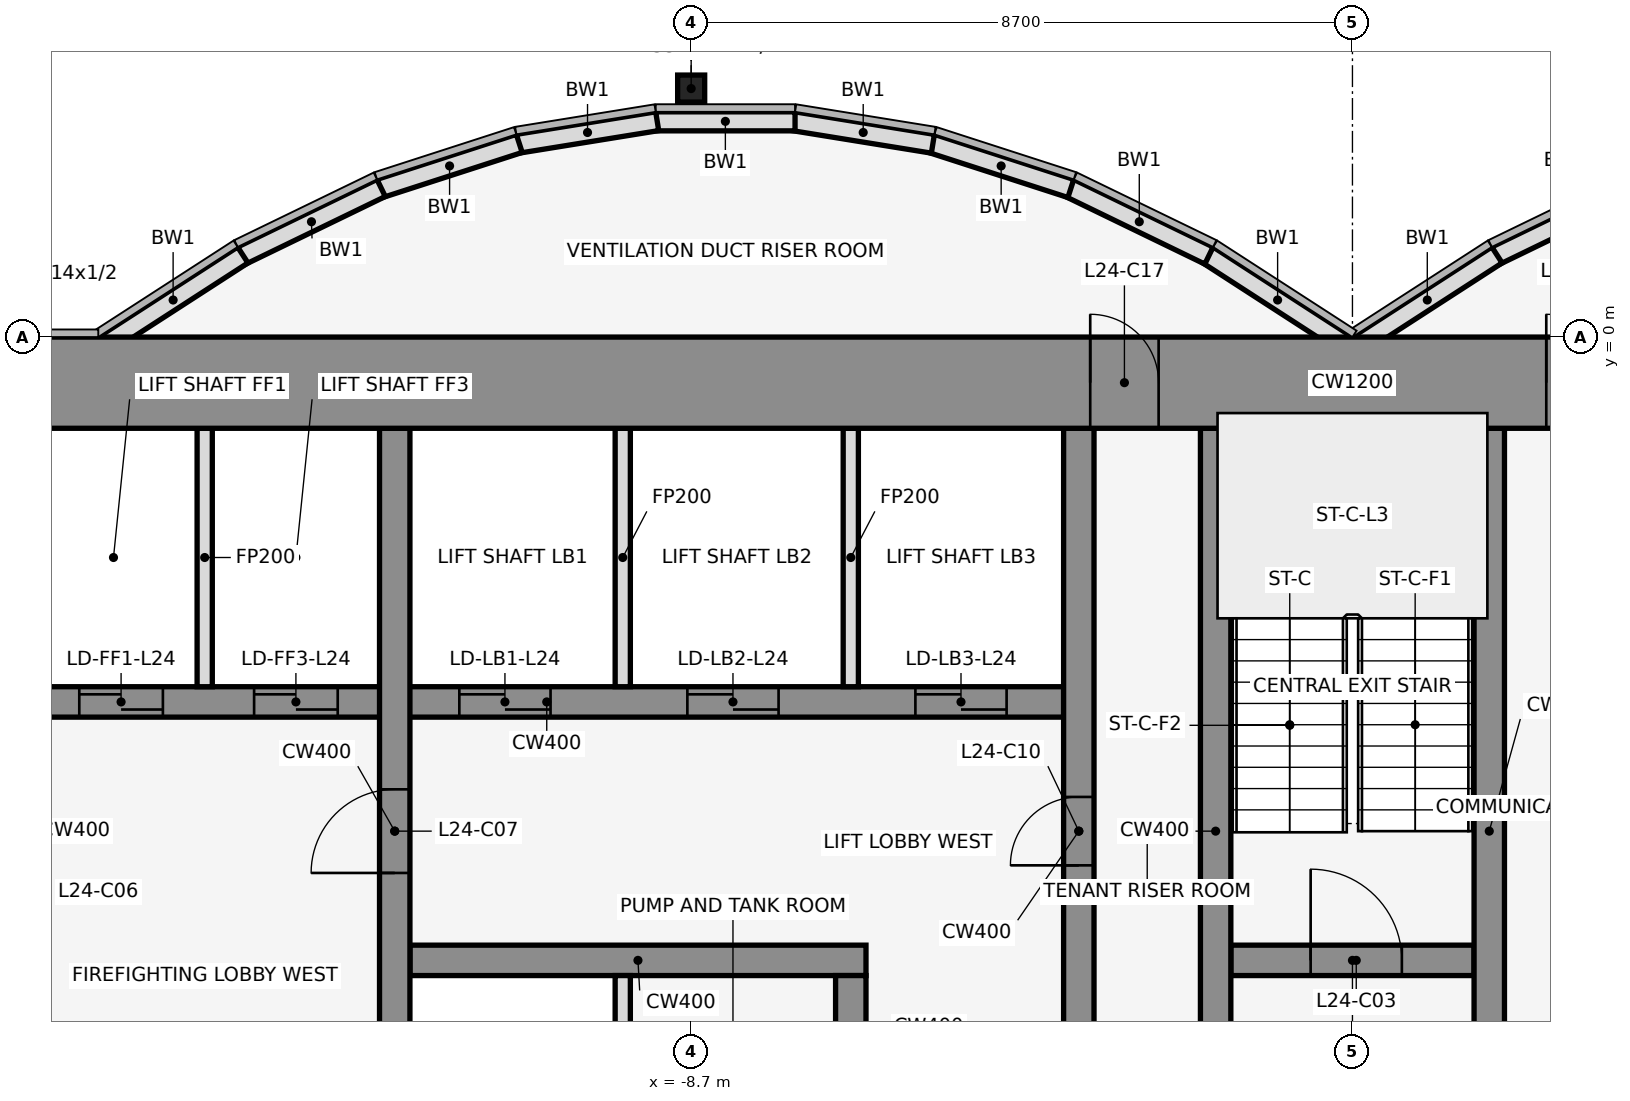
"""IFC4 building model, lengths in metres.
Left out: names, types, materials, properties, quantities, classifications, styles, units other than length and angle.
Written with IfcOpenShell. Run it as: python <this file> out.ifc"""

import sys

from ifc_helpers import new_model, si_unit, direction, frame, frame_2d, origin, origin_2d, place, context, subcontext, project, spatial, rectangle, hollow_rectangle, extrude, element, fill, save


model = new_model("IFC4")
c1 = context("Model", 3, precision=1e-05, world=origin(), true_north=direction((0.0, 1.0)))
c2 = subcontext(c1, "Body", "Model", "MODEL_VIEW")
j1 = project(units=[si_unit("LENGTHUNIT", "METRE"), si_unit("PLANEANGLEUNIT", "RADIAN")], contexts=[c1])
p1 = place(None, origin())
s1 = spatial("IfcSite", under=j1, at=p1, CompositionType="ELEMENT")
p2 = place(p1, origin())
s2 = spatial("IfcBuilding", under=s1, at=p2, CompositionType="ELEMENT")
p3 = place(p2, frame((0.0, 0.0, 114.5)))
s3 = spatial("IfcBuildingStorey", under=s2, at=p3, CompositionType="ELEMENT", Elevation=114.5)
p4 = place(p3, frame((-8.7, 3.269, 0.0), z_axis=(0.0, 0.0, 1.0), x_axis=(1.0, 0.0, 0.0)))
e1 = element("IfcColumn", 1, at=p4, inside=s3, PredefinedType="COLUMN", context=c2, shape_type="SweptSolid", body=[
    extrude(hollow_rectangle(XDim=0.356, YDim=0.356, WallThickness=0.012, at=origin_2d()), origin(), (0.0, 0.0, 1.0), 4.1),
])
p5 = place(p3, frame((3.721, 1.962, 0.0), z_axis=(0.0, 0.0, 1.0), x_axis=(-0.89982408427, -0.436252928206, 0.0)))
e2 = element("IfcWall", 2, at=p5, inside=s3, PredefinedType="STANDARD", context=c2, shape_type="SweptSolid", body=[
    extrude(rectangle(XDim=2.038, YDim=0.25, at=frame_2d((1.019, 0.0))), origin(), (0.0, 0.0, 1.0), 3.95),
])
for number, where, z_axis, x_axis in (
    (3, (1.901, 1.08, 0.0), (0.0, 0.0, 1.0), (-0.84, -0.543, 0.0)),
    (4, (-0.068, -0.105, 0.0), (0.0, 0.0, 1.0), (-0.84, 0.543, 0.0)),
):
    element("IfcWall", number, at=place(p3, frame(where, z_axis=z_axis, x_axis=x_axis)), inside=s3, PredefinedType="STANDARD", context=c2, shape_type="SweptSolid", body=[
        extrude(rectangle(XDim=2.183, YDim=0.25, at=frame_2d((1.091, 0.0))), origin(), (0.0, 0.0, 1.0), 3.95),
    ])
p6 = place(p3, frame((-1.888, 1.073, 0.0), z_axis=(0.0, 0.0, 1.0), x_axis=(-0.89982408427, 0.436252928206, 0.0)))
e5 = element("IfcWall", 5, at=p6, inside=s3, PredefinedType="STANDARD", context=c2, shape_type="SweptSolid", body=[
    extrude(rectangle(XDim=2.038, YDim=0.25, at=frame_2d((1.019, 0.0))), origin(), (0.0, 0.0, 1.0), 3.95),
])
p7 = place(p3, frame((-3.705, 1.955, 0.0), z_axis=(0.0, 0.0, 1.0), x_axis=(-0.951495806175, 0.307661714928, 0.0)))
e6 = element("IfcWall", 6, at=p7, inside=s3, PredefinedType="STANDARD", context=c2, shape_type="SweptSolid", body=[
    extrude(rectangle(XDim=1.927, YDim=0.25, at=frame_2d((0.963, 0.0))), origin(), (0.0, 0.0, 1.0), 3.95),
])
p8 = place(p3, frame((-5.52, 2.543, 0.0), z_axis=(0.0, 0.0, 1.0), x_axis=(-0.987181718931, 0.159600293885, 0.0)))
e7 = element("IfcWall", 7, at=p8, inside=s3, PredefinedType="STANDARD", context=c2, shape_type="SweptSolid", body=[
    extrude(rectangle(XDim=1.857, YDim=0.25, at=frame_2d((0.929, 0.0))), origin(), (0.0, 0.0, 1.0), 3.95),
])
p9 = place(p3, frame((-7.333, 2.838, 0.0), z_axis=(0.0, 0.0, 1.0), x_axis=(-1.0, 0.0, 0.0)))
e8 = element("IfcWall", 8, at=p9, inside=s3, PredefinedType="STANDARD", context=c2, shape_type="SweptSolid", body=[
    extrude(rectangle(XDim=1.833, YDim=0.25, at=frame_2d((0.917, 0.0))), origin(), (0.0, 0.0, 1.0), 3.95),
])
p10 = place(p3, frame((-9.147, 2.84, 0.0), z_axis=(0.0, 0.0, 1.0), x_axis=(-0.987181718931, -0.159600293885, 0.0)))
e9 = element("IfcWall", 9, at=p10, inside=s3, PredefinedType="STANDARD", context=c2, shape_type="SweptSolid", body=[
    extrude(rectangle(XDim=1.857, YDim=0.25, at=frame_2d((0.929, 0.0))), origin(), (0.0, 0.0, 1.0), 3.95),
])
p11 = place(p3, frame((-10.962, 2.548, 0.0), z_axis=(0.0, 0.0, 1.0), x_axis=(-0.951495806175, -0.307661714928, 0.0)))
e10 = element("IfcWall", 10, at=p11, inside=s3, PredefinedType="STANDARD", context=c2, shape_type="SweptSolid", body=[
    extrude(rectangle(XDim=1.927, YDim=0.25, at=frame_2d((0.963, 0.0))), origin(), (0.0, 0.0, 1.0), 3.95),
])
p12 = place(p3, frame((-12.779, 1.962, 0.0), z_axis=(0.0, 0.0, 1.0), x_axis=(-0.89982408427, -0.436252928206, 0.0)))
e11 = element("IfcWall", 11, at=p12, inside=s3, PredefinedType="STANDARD", context=c2, shape_type="SweptSolid", body=[
    extrude(rectangle(XDim=2.038, YDim=0.25, at=frame_2d((1.019, 0.0))), origin(), (0.0, 0.0, 1.0), 3.95),
])
p13 = place(p3, frame((-14.599, 1.08, 0.0), z_axis=(0.0, 0.0, 1.0), x_axis=(-0.83981312244, -0.542875602121, 0.0)))
e12 = element("IfcWall", 12, at=p13, inside=s3, PredefinedType="STANDARD", context=c2, shape_type="SweptSolid", body=[
    extrude(rectangle(XDim=2.183, YDim=0.25, at=frame_2d((1.091, 0.0))), origin(), (0.0, 0.0, 1.0), 3.95),
])
p14 = place(p3, frame((-12.4, -8.2, 0.0), z_axis=(0.0, 0.0, 1.0), x_axis=(1.0, 0.0, 0.0)))
e13 = element("IfcWall", 13, at=p14, inside=s3, PredefinedType="SHEAR", context=c2, shape_type="SweptSolid", body=[
    extrude(rectangle(XDim=6.0, YDim=0.4, at=frame_2d((3.0, 0.0))), origin(), (0.0, 0.0, 1.0), 4.1),
])
p15 = place(p3, frame((-1.6, -8.2, 0.0), z_axis=(0.0, 0.0, 1.0), x_axis=(1.0, 0.0, 0.0)))
e14 = element("IfcWall", 14, at=p15, inside=s3, PredefinedType="SHEAR", context=c2, shape_type="SweptSolid", body=[
    extrude(rectangle(XDim=3.2, YDim=0.4, at=frame_2d((1.6, 0.0))), origin(), (0.0, 0.0, 1.0), 4.1),
])
p16 = place(p15, frame((1.05, 0.0, 0.0)))
e15 = element("IfcOpeningElement", 15, at=p16, cuts=e14, PredefinedType="OPENING", context=c2, shape_type="SweptSolid", body=[
    extrude(rectangle(XDim=1.2, YDim=2.1, at=frame_2d((0.6, 1.05))), frame((0.0, 0.212, 0.0), z_axis=(0.0, -1.0, 0.0), x_axis=(1.0, 0.0, 0.0)), (0.0, 0.0, 1.0), 0.424),
])
p17 = place(p3, frame((-17.4, -4.8, 0.0), z_axis=(0.0, 0.0, 1.0), x_axis=(1.0, 0.0, 0.0)))
e16 = element("IfcWall", 16, at=p17, inside=s3, PredefinedType="SHEAR", context=c2, shape_type="SweptSolid", body=[
    extrude(rectangle(XDim=13.6, YDim=0.4, at=frame_2d((6.8, 0.0))), origin(), (0.0, 0.0, 1.0), 4.1),
])
p18 = place(p17, frame((0.65, 0.0, 0.0)))
e17 = element("IfcOpeningElement", 17, at=p18, cuts=e16, PredefinedType="OPENING", context=c2, shape_type="SweptSolid", body=[
    extrude(rectangle(XDim=1.1, YDim=2.1, at=frame_2d((0.55, 1.05))), frame((0.0, 0.212, 0.0), z_axis=(0.0, -1.0, 0.0), x_axis=(1.0, 0.0, 0.0)), (0.0, 0.0, 1.0), 0.424),
])
p19 = place(p17, frame((2.95, 0.0, 0.0)))
e18 = element("IfcOpeningElement", 18, at=p19, cuts=e16, PredefinedType="OPENING", context=c2, shape_type="SweptSolid", body=[
    extrude(rectangle(XDim=1.1, YDim=2.1, at=frame_2d((0.55, 1.05))), frame((0.0, 0.212, 0.0), z_axis=(0.0, -1.0, 0.0), x_axis=(1.0, 0.0, 0.0)), (0.0, 0.0, 1.0), 0.424),
])
p20 = place(p17, frame((5.65, 0.0, 0.0)))
e19 = element("IfcOpeningElement", 19, at=p20, cuts=e16, PredefinedType="OPENING", context=c2, shape_type="SweptSolid", body=[
    extrude(rectangle(XDim=1.2, YDim=2.1, at=frame_2d((0.6, 1.05))), frame((0.0, 0.212, 0.0), z_axis=(0.0, -1.0, 0.0), x_axis=(1.0, 0.0, 0.0)), (0.0, 0.0, 1.0), 0.424),
])
p21 = place(p17, frame((8.65, 0.0, 0.0)))
e20 = element("IfcOpeningElement", 20, at=p21, cuts=e16, PredefinedType="OPENING", context=c2, shape_type="SweptSolid", body=[
    extrude(rectangle(XDim=1.2, YDim=2.1, at=frame_2d((0.6, 1.05))), frame((0.0, 0.212, 0.0), z_axis=(0.0, -1.0, 0.0), x_axis=(1.0, 0.0, 0.0)), (0.0, 0.0, 1.0), 0.424),
])
p22 = place(p17, frame((11.65, 0.0, 0.0)))
e21 = element("IfcOpeningElement", 21, at=p22, cuts=e16, PredefinedType="OPENING", context=c2, shape_type="SweptSolid", body=[
    extrude(rectangle(XDim=1.2, YDim=2.1, at=frame_2d((0.6, 1.05))), frame((0.0, 0.212, 0.0), z_axis=(0.0, -1.0, 0.0), x_axis=(1.0, 0.0, 0.0)), (0.0, 0.0, 1.0), 0.424),
])
p23 = place(p3, frame((-15.1, -4.6, 0.0), z_axis=(0.0, 0.0, 1.0), x_axis=(0.0, 1.0, 0.0)))
e22 = element("IfcWall", 22, at=p23, inside=s3, PredefinedType="PARTITIONING", context=c2, shape_type="SweptSolid", body=[
    extrude(rectangle(XDim=3.4, YDim=0.2, at=frame_2d((1.7, 0.0))), origin(), (0.0, 0.0, 1.0), 3.018),
])
p24 = place(p3, frame((-12.6, -11.8, 0.0), z_axis=(0.0, 0.0, 1.0), x_axis=(0.0, 1.0, 0.0)))
e23 = element("IfcWall", 23, at=p24, inside=s3, PredefinedType="SHEAR", context=c2, shape_type="SweptSolid", body=[
    extrude(rectangle(XDim=10.6, YDim=0.4, at=frame_2d((5.3, 0.0))), origin(), (0.0, 0.0, 1.0), 4.1),
])
p25 = place(p24, frame((4.75, 0.0, 0.0)))
e24 = element("IfcOpeningElement", 24, at=p25, cuts=e23, PredefinedType="OPENING", context=c2, shape_type="SweptSolid", body=[
    extrude(rectangle(XDim=1.1, YDim=2.1, at=frame_2d((0.55, 1.05))), frame((0.0, 0.212, 0.0), z_axis=(0.0, -1.0, 0.0), x_axis=(1.0, 0.0, 0.0)), (0.0, 0.0, 1.0), 0.424),
])
for number, where, z_axis, x_axis in (
    (25, (-9.6, -11.8, 0.0), (0.0, 0.0, 1.0), (0.0, 1.0, 0.0)),
    (26, (-9.6, -4.6, 0.0), (0.0, 0.0, 1.0), (0.0, 1.0, 0.0)),
):
    element("IfcWall", number, at=place(p3, frame(where, z_axis=z_axis, x_axis=x_axis)), inside=s3, PredefinedType="PARTITIONING", context=c2, shape_type="SweptSolid", body=[
        extrude(rectangle(XDim=3.4, YDim=0.2, at=frame_2d((1.7, 0.0))), origin(), (0.0, 0.0, 1.0), 3.018),
    ])
p26 = place(p3, frame((-6.6, -11.8, 0.0), z_axis=(0.0, 0.0, 1.0), x_axis=(0.0, 1.0, 0.0)))
e27 = element("IfcWall", 27, at=p26, inside=s3, PredefinedType="SHEAR", context=c2, shape_type="SweptSolid", body=[
    extrude(rectangle(XDim=3.4, YDim=0.4, at=frame_2d((1.7, 0.0))), origin(), (0.0, 0.0, 1.0), 4.1),
])
p27 = place(p26, frame((1.25, 0.0, 0.0)))
e28 = element("IfcOpeningElement", 28, at=p27, cuts=e27, PredefinedType="OPENING", context=c2, shape_type="SweptSolid", body=[
    extrude(rectangle(XDim=0.9, YDim=2.1, at=frame_2d((0.45, 1.05))), frame((0.0, 0.212, 0.0), z_axis=(0.0, -1.0, 0.0), x_axis=(1.0, 0.0, 0.0)), (0.0, 0.0, 1.0), 0.424),
])
p28 = place(p3, frame((-6.6, -4.6, 0.0), z_axis=(0.0, 0.0, 1.0), x_axis=(0.0, 1.0, 0.0)))
e29 = element("IfcWall", 29, at=p28, inside=s3, PredefinedType="PARTITIONING", context=c2, shape_type="SweptSolid", body=[
    extrude(rectangle(XDim=3.4, YDim=0.2, at=frame_2d((1.7, 0.0))), origin(), (0.0, 0.0, 1.0), 3.018),
])
p29 = place(p3, frame((-3.6, -11.8, 0.0), z_axis=(0.0, 0.0, 1.0), x_axis=(0.0, 1.0, 0.0)))
e30 = element("IfcWall", 30, at=p29, inside=s3, PredefinedType="SHEAR", context=c2, shape_type="SweptSolid", body=[
    extrude(rectangle(XDim=10.6, YDim=0.4, at=frame_2d((5.3, 0.0))), origin(), (0.0, 0.0, 1.0), 4.1),
])
p30 = place(p29, frame((4.85, 0.0, 0.0)))
e31 = element("IfcOpeningElement", 31, at=p30, cuts=e30, PredefinedType="OPENING", context=c2, shape_type="SweptSolid", body=[
    extrude(rectangle(XDim=0.9, YDim=2.1, at=frame_2d((0.45, 1.05))), frame((0.0, 0.212, 0.0), z_axis=(0.0, -1.0, 0.0), x_axis=(1.0, 0.0, 0.0)), (0.0, 0.0, 1.0), 0.424),
])
for number, where, z_axis, x_axis in (
    (32, (-1.8, -11.8, 0.0), (0.0, 0.0, 1.0), (0.0, 1.0, 0.0)),
    (33, (1.8, -11.8, 0.0), (0.0, 0.0, 1.0), (0.0, 1.0, 0.0)),
):
    element("IfcWall", number, at=place(p3, frame(where, z_axis=z_axis, x_axis=x_axis)), inside=s3, PredefinedType="SHEAR", context=c2, shape_type="SweptSolid", body=[
        extrude(rectangle(XDim=10.6, YDim=0.4, at=frame_2d((5.3, 0.0))), origin(), (0.0, 0.0, 1.0), 4.1),
    ])
p31 = place(p3, frame((-22.0, -0.6, 0.0), z_axis=(0.0, 0.0, 1.0), x_axis=(1.0, 0.0, 0.0)))
e34 = element("IfcWall", 34, at=p31, inside=s3, PredefinedType="SHEAR", context=c2, shape_type="SweptSolid", body=[
    extrude(rectangle(XDim=44.0, YDim=1.2, at=frame_2d((22.0, 0.0))), origin(), (0.0, 0.0, 1.0), 4.1),
])
p32 = place(p31, frame((18.55, 0.0, 0.0)))
e35 = element("IfcOpeningElement", 35, at=p32, cuts=e34, PredefinedType="OPENING", context=c2, shape_type="SweptSolid", body=[
    extrude(rectangle(XDim=0.9, YDim=2.1, at=frame_2d((0.45, 1.05))), frame((0.0, 0.612, 0.0), z_axis=(0.0, -1.0, 0.0), x_axis=(1.0, 0.0, 0.0)), (0.0, 0.0, 1.0), 1.224),
])
p33 = place(p31, frame((24.55, 0.0, 0.0)))
e36 = element("IfcOpeningElement", 36, at=p33, cuts=e34, PredefinedType="OPENING", context=c2, shape_type="SweptSolid", body=[
    extrude(rectangle(XDim=0.9, YDim=2.1, at=frame_2d((0.45, 1.05))), frame((0.0, 0.612, 0.0), z_axis=(0.0, -1.0, 0.0), x_axis=(1.0, 0.0, 0.0)), (0.0, 0.0, 1.0), 1.224),
])
p34 = place(p16, origin())
e37 = element("IfcDoor", 37, at=p34, inside=s3, OperationType="SINGLE_SWING_LEFT", PredefinedType="DOOR", context=c2, shape_type="SweptSolid", body=[
    extrude(rectangle(XDim=1.2, YDim=2.1, at=frame_2d((0.6, 1.05))), frame((0.0, 0.025, 0.0), z_axis=(0.0, -1.0, 0.0), x_axis=(1.0, 0.0, 0.0)), (0.0, 0.0, 1.0), 0.05),
])
fill(e15, e37)
p35 = place(p18, origin())
e38 = element("IfcDoor", 38, at=p35, inside=s3, OperationType="DOUBLE_DOOR_SLIDING", PredefinedType="DOOR", context=c2, shape_type="SweptSolid", body=[
    extrude(rectangle(XDim=1.1, YDim=2.1, at=frame_2d((0.55, 1.05))), frame((0.0, 0.025, 0.0), z_axis=(0.0, -1.0, 0.0), x_axis=(1.0, 0.0, 0.0)), (0.0, 0.0, 1.0), 0.05),
])
fill(e17, e38)
p36 = place(p19, origin())
e39 = element("IfcDoor", 39, at=p36, inside=s3, OperationType="DOUBLE_DOOR_SLIDING", PredefinedType="DOOR", context=c2, shape_type="SweptSolid", body=[
    extrude(rectangle(XDim=1.1, YDim=2.1, at=frame_2d((0.55, 1.05))), frame((0.0, 0.025, 0.0), z_axis=(0.0, -1.0, 0.0), x_axis=(1.0, 0.0, 0.0)), (0.0, 0.0, 1.0), 0.05),
])
fill(e18, e39)
p37 = place(p20, origin())
e40 = element("IfcDoor", 40, at=p37, inside=s3, OperationType="DOUBLE_DOOR_SLIDING", PredefinedType="DOOR", context=c2, shape_type="SweptSolid", body=[
    extrude(rectangle(XDim=1.2, YDim=2.1, at=frame_2d((0.6, 1.05))), frame((0.0, 0.025, 0.0), z_axis=(0.0, -1.0, 0.0), x_axis=(1.0, 0.0, 0.0)), (0.0, 0.0, 1.0), 0.05),
])
fill(e19, e40)
p38 = place(p21, origin())
e41 = element("IfcDoor", 41, at=p38, inside=s3, OperationType="DOUBLE_DOOR_SLIDING", PredefinedType="DOOR", context=c2, shape_type="SweptSolid", body=[
    extrude(rectangle(XDim=1.2, YDim=2.1, at=frame_2d((0.6, 1.05))), frame((0.0, 0.025, 0.0), z_axis=(0.0, -1.0, 0.0), x_axis=(1.0, 0.0, 0.0)), (0.0, 0.0, 1.0), 0.05),
])
fill(e20, e41)
p39 = place(p22, origin())
e42 = element("IfcDoor", 42, at=p39, inside=s3, OperationType="DOUBLE_DOOR_SLIDING", PredefinedType="DOOR", context=c2, shape_type="SweptSolid", body=[
    extrude(rectangle(XDim=1.2, YDim=2.1, at=frame_2d((0.6, 1.05))), frame((0.0, 0.025, 0.0), z_axis=(0.0, -1.0, 0.0), x_axis=(1.0, 0.0, 0.0)), (0.0, 0.0, 1.0), 0.05),
])
fill(e21, e42)
p40 = place(p25, origin())
e43 = element("IfcDoor", 43, at=p40, inside=s3, OperationType="SINGLE_SWING_LEFT", PredefinedType="DOOR", context=c2, shape_type="SweptSolid", body=[
    extrude(rectangle(XDim=1.1, YDim=2.1, at=frame_2d((0.55, 1.05))), frame((0.0, 0.025, 0.0), z_axis=(0.0, -1.0, 0.0), x_axis=(1.0, 0.0, 0.0)), (0.0, 0.0, 1.0), 0.05),
])
fill(e24, e43)
p41 = place(p30, frame((0.9, 0.0, 0.0), z_axis=(0.0, 0.0, 1.0), x_axis=(-1.0, 0.0, 0.0)))
e44 = element("IfcDoor", 44, at=p41, inside=s3, OperationType="SINGLE_SWING_LEFT", PredefinedType="DOOR", context=c2, shape_type="SweptSolid", body=[
    extrude(rectangle(XDim=0.9, YDim=2.1, at=frame_2d((0.45, 1.05))), frame((0.0, 0.025, 0.0), z_axis=(0.0, -1.0, 0.0), x_axis=(1.0, 0.0, 0.0)), (0.0, 0.0, 1.0), 0.05),
])
fill(e31, e44)
p42 = place(p32, origin())
e45 = element("IfcDoor", 45, at=p42, inside=s3, OperationType="SINGLE_SWING_LEFT", PredefinedType="DOOR", context=c2, shape_type="SweptSolid", body=[
    extrude(rectangle(XDim=0.9, YDim=2.1, at=frame_2d((0.45, 1.05))), frame((0.0, 0.025, 0.0), z_axis=(0.0, -1.0, 0.0), x_axis=(1.0, 0.0, 0.0)), (0.0, 0.0, 1.0), 0.05),
])
fill(e35, e45)
p43 = place(p33, origin())
e46 = element("IfcDoor", 46, at=p43, inside=s3, OperationType="SINGLE_SWING_LEFT", PredefinedType="DOOR", context=c2, shape_type="SweptSolid", body=[
    extrude(rectangle(XDim=0.9, YDim=2.1, at=frame_2d((0.45, 1.05))), frame((0.0, 0.025, 0.0), z_axis=(0.0, -1.0, 0.0), x_axis=(1.0, 0.0, 0.0)), (0.0, 0.0, 1.0), 0.05),
])
fill(e36, e46)
save(model, sys.argv[1])
